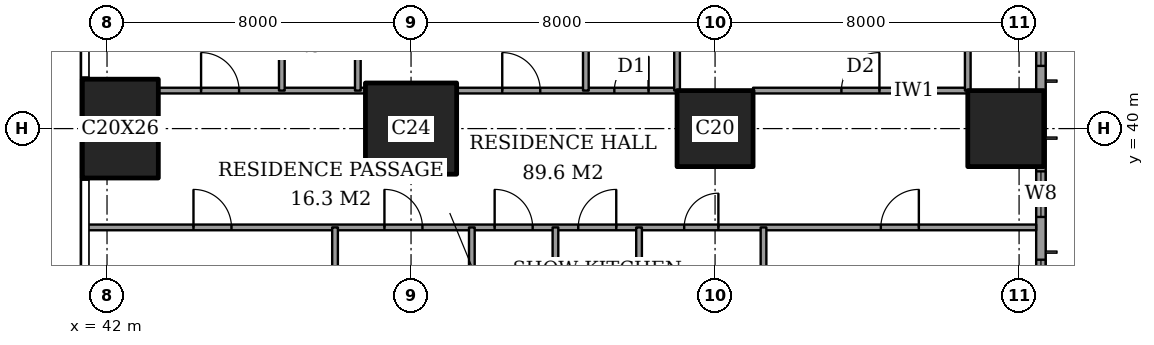
"""IFC4 building model, lengths in metres.
Left out: names, types, materials, properties, quantities, classifications, styles, units other than length and angle.
Written with IfcOpenShell. Run it as: python <this file> out.ifc"""

import sys

from ifc_helpers import new_model, si_unit, direction, frame, frame_2d, origin, origin_2d, place, context, subcontext, project, spatial, rectangle, extrude, element, fill, save


model = new_model("IFC4")
c1 = context("Model", 3, precision=1e-05, world=origin(), true_north=direction((0.0, 1.0)))
c2 = subcontext(c1, "Body", "Model", "MODEL_VIEW")
j1 = project(units=[si_unit("LENGTHUNIT", "METRE"), si_unit("PLANEANGLEUNIT", "RADIAN")], contexts=[c1])
p1 = place(None, origin())
s1 = spatial("IfcSite", under=j1, at=p1, CompositionType="ELEMENT")
p2 = place(p1, origin())
s2 = spatial("IfcBuilding", under=s1, at=p2, CompositionType="ELEMENT")
p3 = place(p2, frame((0.0, 0.0, 36.8)))
s3 = spatial("IfcBuildingStorey", under=s2, at=p3, CompositionType="ELEMENT", Elevation=36.8)
p4 = place(p3, frame((42.35, 40.0, 0.0), z_axis=(0.0, 0.0, 1.0), x_axis=(1.0, 0.0, 0.0)))
e1 = element("IfcColumn", 1, at=p4, inside=s3, PredefinedType="COLUMN", context=c2, shape_type="SweptSolid", body=[
    extrude(rectangle(XDim=2.0, YDim=2.6, at=origin_2d()), origin(), (0.0, 0.0, 1.0), 3.6),
])
p5 = place(p3, frame((50.0, 40.0, 0.0), z_axis=(0.0, 0.0, 1.0), x_axis=(1.0, 0.0, 0.0)))
e2 = element("IfcColumn", 2, at=p5, inside=s3, PredefinedType="COLUMN", context=c2, shape_type="SweptSolid", body=[
    extrude(rectangle(XDim=2.4, YDim=2.4, at=origin_2d()), origin(), (0.0, 0.0, 1.0), 3.6),
])
for number, where, z_axis, x_axis in (
    (3, (58.0, 40.0, 0.0), (0.0, 0.0, 1.0), (1.0, 0.0, 0.0)),
    (4, (65.65, 40.0, 0.0), (0.0, 0.0, 1.0), (1.0, 0.0, 0.0)),
):
    element("IfcColumn", number, at=place(p3, frame(where, z_axis=z_axis, x_axis=x_axis)), inside=s3, PredefinedType="COLUMN", context=c2, shape_type="SweptSolid", body=[
        extrude(rectangle(XDim=2.0, YDim=2.0, at=origin_2d()), origin(), (0.0, 0.0, 1.0), 3.6),
    ])
p6 = place(p3, frame((66.575, 3.175, 0.0), z_axis=(0.0, 0.0, 1.0), x_axis=(0.0, 1.0, 0.0)))
e5 = element("IfcWall", 5, at=p6, inside=s3, PredefinedType="SOLIDWALL", context=c2, shape_type="SweptSolid", body=[
    extrude(rectangle(XDim=41.65, YDim=0.25, at=frame_2d((20.825, 0.0))), origin(), (0.0, 0.0, 1.0), 3.6),
])
p7 = place(p6, frame((0.775, 0.0, 0.6)))
e6 = element("IfcOpeningElement", 6, at=p7, cuts=e5, PredefinedType="OPENING", context=c2, shape_type="SweptSolid", body=[
    extrude(rectangle(XDim=2.4, YDim=2.0, at=frame_2d((1.2, 1.0))), frame((0.0, 0.135, 0.0), z_axis=(0.0, -1.0, 0.0), x_axis=(1.0, 0.0, 0.0)), (0.0, 0.0, 1.0), 0.27),
])
p8 = place(p6, frame((6.1, 0.0, 0.6)))
e7 = element("IfcOpeningElement", 7, at=p8, cuts=e5, PredefinedType="OPENING", context=c2, shape_type="SweptSolid", body=[
    extrude(rectangle(XDim=1.2, YDim=2.0, at=frame_2d((0.6, 1.0))), frame((0.0, 0.135, 0.0), z_axis=(0.0, -1.0, 0.0), x_axis=(1.0, 0.0, 0.0)), (0.0, 0.0, 1.0), 0.27),
])
p9 = place(p6, frame((8.275, 0.0, 0.6)))
e8 = element("IfcOpeningElement", 8, at=p9, cuts=e5, PredefinedType="OPENING", context=c2, shape_type="SweptSolid", body=[
    extrude(rectangle(XDim=2.4, YDim=2.0, at=frame_2d((1.2, 1.0))), frame((0.0, 0.135, 0.0), z_axis=(0.0, -1.0, 0.0), x_axis=(1.0, 0.0, 0.0)), (0.0, 0.0, 1.0), 0.27),
])
p10 = place(p6, frame((15.775, 0.0, 0.6)))
e9 = element("IfcOpeningElement", 9, at=p10, cuts=e5, PredefinedType="OPENING", context=c2, shape_type="SweptSolid", body=[
    extrude(rectangle(XDim=2.4, YDim=2.0, at=frame_2d((1.2, 1.0))), frame((0.0, 0.135, 0.0), z_axis=(0.0, -1.0, 0.0), x_axis=(1.0, 0.0, 0.0)), (0.0, 0.0, 1.0), 0.27),
])
p11 = place(p6, frame((23.475, 0.0, 0.6)))
e10 = element("IfcOpeningElement", 10, at=p11, cuts=e5, PredefinedType="OPENING", context=c2, shape_type="SweptSolid", body=[
    extrude(rectangle(XDim=2.4, YDim=2.0, at=frame_2d((1.2, 1.0))), frame((0.0, 0.135, 0.0), z_axis=(0.0, -1.0, 0.0), x_axis=(1.0, 0.0, 0.0)), (0.0, 0.0, 1.0), 0.27),
])
p12 = place(p6, frame((30.975, 0.0, 0.6)))
e11 = element("IfcOpeningElement", 11, at=p12, cuts=e5, PredefinedType="OPENING", context=c2, shape_type="SweptSolid", body=[
    extrude(rectangle(XDim=2.4, YDim=2.0, at=frame_2d((1.2, 1.0))), frame((0.0, 0.135, 0.0), z_axis=(0.0, -1.0, 0.0), x_axis=(1.0, 0.0, 0.0)), (0.0, 0.0, 1.0), 0.27),
])
p13 = place(p6, frame((34.5, 0.0, 0.6)))
e12 = element("IfcOpeningElement", 12, at=p13, cuts=e5, PredefinedType="OPENING", context=c2, shape_type="SweptSolid", body=[
    extrude(rectangle(XDim=1.2, YDim=2.0, at=frame_2d((0.6, 1.0))), frame((0.0, 0.135, 0.0), z_axis=(0.0, -1.0, 0.0), x_axis=(1.0, 0.0, 0.0)), (0.0, 0.0, 1.0), 0.27),
])
p14 = place(p6, frame((38.475, 0.0, 0.6)))
e13 = element("IfcOpeningElement", 13, at=p14, cuts=e5, PredefinedType="OPENING", context=c2, shape_type="SweptSolid", body=[
    extrude(rectangle(XDim=2.4, YDim=2.0, at=frame_2d((1.2, 1.0))), frame((0.0, 0.135, 0.0), z_axis=(0.0, -1.0, 0.0), x_axis=(1.0, 0.0, 0.0)), (0.0, 0.0, 1.0), 0.27),
])
p15 = place(p3, frame((41.439, 37.4, 0.0), z_axis=(0.0, 0.0, 1.0), x_axis=(1.0, 0.0, 0.0)))
e14 = element("IfcWall", 14, at=p15, inside=s3, PredefinedType="PARTITIONING", context=c2, shape_type="SweptSolid", body=[
    extrude(rectangle(XDim=25.011, YDim=0.15, at=frame_2d((12.505, 0.0))), origin(), (0.0, 0.0, 1.0), 3.35),
])
p16 = place(p15, frame((10.761, 0.0, 0.0)))
e15 = element("IfcOpeningElement", 15, at=p16, cuts=e14, PredefinedType="OPENING", context=c2, shape_type="SweptSolid", body=[
    extrude(rectangle(XDim=1.0, YDim=2.1, at=frame_2d((0.5, 1.05))), frame((0.0, 0.085, 0.0), z_axis=(0.0, -1.0, 0.0), x_axis=(1.0, 0.0, 0.0)), (0.0, 0.0, 1.0), 0.17),
])
p17 = place(p15, frame((20.924, 0.0, 0.0)))
e16 = element("IfcOpeningElement", 16, at=p17, cuts=e14, PredefinedType="OPENING", context=c2, shape_type="SweptSolid", body=[
    extrude(rectangle(XDim=1.0, YDim=2.1, at=frame_2d((0.5, 1.05))), frame((0.0, 0.085, 0.0), z_axis=(0.0, -1.0, 0.0), x_axis=(1.0, 0.0, 0.0)), (0.0, 0.0, 1.0), 0.17),
])
p18 = place(p15, frame((15.749, 0.0, 0.0)))
e17 = element("IfcOpeningElement", 17, at=p18, cuts=e14, PredefinedType="OPENING", context=c2, shape_type="SweptSolid", body=[
    extrude(rectangle(XDim=0.9, YDim=2.1, at=frame_2d((0.45, 1.05))), frame((0.0, 0.085, 0.0), z_axis=(0.0, -1.0, 0.0), x_axis=(1.0, 0.0, 0.0)), (0.0, 0.0, 1.0), 0.17),
])
p19 = place(p15, frame((12.961, 0.0, 0.0)))
e18 = element("IfcOpeningElement", 18, at=p19, cuts=e14, PredefinedType="OPENING", context=c2, shape_type="SweptSolid", body=[
    extrude(rectangle(XDim=1.0, YDim=2.1, at=frame_2d((0.5, 1.05))), frame((0.0, 0.085, 0.0), z_axis=(0.0, -1.0, 0.0), x_axis=(1.0, 0.0, 0.0)), (0.0, 0.0, 1.0), 0.17),
])
p20 = place(p15, frame((7.861, 0.0, 0.0)))
e19 = element("IfcOpeningElement", 19, at=p20, cuts=e14, PredefinedType="OPENING", context=c2, shape_type="SweptSolid", body=[
    extrude(rectangle(XDim=1.0, YDim=2.1, at=frame_2d((0.5, 1.05))), frame((0.0, 0.085, 0.0), z_axis=(0.0, -1.0, 0.0), x_axis=(1.0, 0.0, 0.0)), (0.0, 0.0, 1.0), 0.17),
])
p21 = place(p15, frame((2.836, 0.0, 0.0)))
e20 = element("IfcOpeningElement", 20, at=p21, cuts=e14, PredefinedType="OPENING", context=c2, shape_type="SweptSolid", body=[
    extrude(rectangle(XDim=1.0, YDim=2.1, at=frame_2d((0.5, 1.05))), frame((0.0, 0.085, 0.0), z_axis=(0.0, -1.0, 0.0), x_axis=(1.0, 0.0, 0.0)), (0.0, 0.0, 1.0), 0.17),
])
p22 = place(p3, frame((43.35, 41.0, 0.0), z_axis=(0.0, 0.0, 1.0), x_axis=(1.0, 0.0, 0.0)))
e21 = element("IfcWall", 21, at=p22, inside=s3, PredefinedType="PARTITIONING", context=c2, shape_type="SweptSolid", body=[
    extrude(rectangle(XDim=5.45, YDim=0.15, at=frame_2d((2.725, 0.0))), origin(), (0.0, 0.0, 1.0), 3.35),
])
p23 = place(p22, frame((1.125, 0.0, 0.0)))
e22 = element("IfcOpeningElement", 22, at=p23, cuts=e21, PredefinedType="OPENING", context=c2, shape_type="SweptSolid", body=[
    extrude(rectangle(XDim=1.0, YDim=2.1, at=frame_2d((0.5, 1.05))), frame((0.0, 0.085, 0.0), z_axis=(0.0, -1.0, 0.0), x_axis=(1.0, 0.0, 0.0)), (0.0, 0.0, 1.0), 0.17),
])
p24 = place(p3, frame((51.2, 41.0, 0.0), z_axis=(0.0, 0.0, 1.0), x_axis=(1.0, 0.0, 0.0)))
e23 = element("IfcWall", 23, at=p24, inside=s3, PredefinedType="PARTITIONING", context=c2, shape_type="SweptSolid", body=[
    extrude(rectangle(XDim=5.8, YDim=0.15, at=frame_2d((2.9, 0.0))), origin(), (0.0, 0.0, 1.0), 3.35),
])
p25 = place(p24, frame((4.15, 0.0, 0.0)))
e24 = element("IfcOpeningElement", 24, at=p25, cuts=e23, PredefinedType="OPENING", context=c2, shape_type="SweptSolid", body=[
    extrude(rectangle(XDim=0.9, YDim=2.1, at=frame_2d((0.45, 1.05))), frame((0.0, 0.085, 0.0), z_axis=(0.0, -1.0, 0.0), x_axis=(1.0, 0.0, 0.0)), (0.0, 0.0, 1.0), 0.17),
])
p26 = place(p24, frame((1.2, 0.0, 0.0)))
e25 = element("IfcOpeningElement", 25, at=p26, cuts=e23, PredefinedType="OPENING", context=c2, shape_type="SweptSolid", body=[
    extrude(rectangle(XDim=1.0, YDim=2.1, at=frame_2d((0.5, 1.05))), frame((0.0, 0.085, 0.0), z_axis=(0.0, -1.0, 0.0), x_axis=(1.0, 0.0, 0.0)), (0.0, 0.0, 1.0), 0.17),
])
p27 = place(p3, frame((59.0, 41.0, 0.0), z_axis=(0.0, 0.0, 1.0), x_axis=(1.0, 0.0, 0.0)))
e26 = element("IfcWall", 26, at=p27, inside=s3, PredefinedType="PARTITIONING", context=c2, shape_type="SweptSolid", body=[
    extrude(rectangle(XDim=5.65, YDim=0.15, at=frame_2d((2.825, 0.0))), origin(), (0.0, 0.0, 1.0), 3.35),
])
p28 = place(p27, frame((2.325, 0.0, 0.0)))
e27 = element("IfcOpeningElement", 27, at=p28, cuts=e26, PredefinedType="OPENING", context=c2, shape_type="SweptSolid", body=[
    extrude(rectangle(XDim=1.0, YDim=2.1, at=frame_2d((0.5, 1.05))), frame((0.0, 0.085, 0.0), z_axis=(0.0, -1.0, 0.0), x_axis=(1.0, 0.0, 0.0)), (0.0, 0.0, 1.0), 0.17),
])
p29 = place(p3, frame((46.6, 41.0, 0.0), z_axis=(0.0, 0.0, 1.0), x_axis=(0.0, 1.0, 0.0)))
e28 = element("IfcWall", 28, at=p29, inside=s3, PredefinedType="PARTITIONING", context=c2, shape_type="SweptSolid", body=[
    extrude(rectangle(XDim=7.45, YDim=0.15, at=frame_2d((3.725, 0.0))), origin(), (0.0, 0.0, 1.0), 3.35),
])
p30 = place(p29, frame((3.275, 0.0, 0.0)))
e29 = element("IfcOpeningElement", 29, at=p30, cuts=e28, PredefinedType="OPENING", context=c2, shape_type="SweptSolid", body=[
    extrude(rectangle(XDim=0.9, YDim=2.1, at=frame_2d((0.45, 1.05))), frame((0.0, 0.085, 0.0), z_axis=(0.0, -1.0, 0.0), x_axis=(1.0, 0.0, 0.0)), (0.0, 0.0, 1.0), 0.17),
])
p31 = place(p3, frame((48.0, 28.0, 0.0), z_axis=(0.0, 0.0, 1.0), x_axis=(0.0, 1.0, 0.0)))
e30 = element("IfcWall", 30, at=p31, inside=s3, PredefinedType="PARTITIONING", context=c2, shape_type="SweptSolid", body=[
    extrude(rectangle(XDim=9.4, YDim=0.15, at=frame_2d((4.7, 0.0))), origin(), (0.0, 0.0, 1.0), 3.35),
])
p32 = place(p31, frame((0.55, 0.0, 0.0)))
e31 = element("IfcOpeningElement", 31, at=p32, cuts=e30, PredefinedType="OPENING", context=c2, shape_type="SweptSolid", body=[
    extrude(rectangle(XDim=0.9, YDim=2.1, at=frame_2d((0.45, 1.05))), frame((0.0, 0.085, 0.0), z_axis=(0.0, -1.0, 0.0), x_axis=(1.0, 0.0, 0.0)), (0.0, 0.0, 1.0), 0.17),
])
p33 = place(p3, frame((48.6, 41.0, 0.0), z_axis=(0.0, 0.0, 1.0), x_axis=(0.0, 1.0, 0.0)))
e32 = element("IfcWall", 32, at=p33, inside=s3, PredefinedType="PARTITIONING", context=c2, shape_type="SweptSolid", body=[
    extrude(rectangle(XDim=7.45, YDim=0.15, at=frame_2d((3.725, 0.0))), origin(), (0.0, 0.0, 1.0), 3.35),
])
for number, where, z_axis, x_axis in (
    (33, (51.6, 30.0, 0.0), (0.0, 0.0, 1.0), (0.0, 1.0, 0.0)),
    (34, (53.8, 30.0, 0.0), (0.0, 0.0, 1.0), (0.0, 1.0, 0.0)),
):
    element("IfcWall", number, at=place(p3, frame(where, z_axis=z_axis, x_axis=x_axis)), inside=s3, PredefinedType="PARTITIONING", context=c2, shape_type="SweptSolid", body=[
        extrude(rectangle(XDim=7.4, YDim=0.15, at=frame_2d((3.7, 0.0))), origin(), (0.0, 0.0, 1.0), 3.35),
    ])
p34 = place(p3, frame((54.6, 41.0, 0.0), z_axis=(0.0, 0.0, 1.0), x_axis=(0.0, 1.0, 0.0)))
e35 = element("IfcWall", 35, at=p34, inside=s3, PredefinedType="PARTITIONING", context=c2, shape_type="SweptSolid", body=[
    extrude(rectangle(XDim=7.45, YDim=0.15, at=frame_2d((3.725, 0.0))), origin(), (0.0, 0.0, 1.0), 3.35),
])
p35 = place(p3, frame((56.0, 28.0, 0.0), z_axis=(0.0, 0.0, 1.0), x_axis=(0.0, 1.0, 0.0)))
e36 = element("IfcWall", 36, at=p35, inside=s3, PredefinedType="PARTITIONING", context=c2, shape_type="SweptSolid", body=[
    extrude(rectangle(XDim=9.4, YDim=0.15, at=frame_2d((4.7, 0.0))), origin(), (0.0, 0.0, 1.0), 3.35),
])
p36 = place(p35, frame((0.5, 0.0, 0.0)))
e37 = element("IfcOpeningElement", 37, at=p36, cuts=e36, PredefinedType="OPENING", context=c2, shape_type="SweptSolid", body=[
    extrude(rectangle(XDim=1.0, YDim=2.1, at=frame_2d((0.5, 1.05))), frame((0.0, 0.085, 0.0), z_axis=(0.0, -1.0, 0.0), x_axis=(1.0, 0.0, 0.0)), (0.0, 0.0, 1.0), 0.17),
])
p37 = place(p3, frame((57.0, 41.0, 0.0), z_axis=(0.0, 0.0, 1.0), x_axis=(0.0, 1.0, 0.0)))
e38 = element("IfcWall", 38, at=p37, inside=s3, PredefinedType="PARTITIONING", context=c2, shape_type="SweptSolid", body=[
    extrude(rectangle(XDim=5.65, YDim=0.15, at=frame_2d((2.825, 0.0))), origin(), (0.0, 0.0, 1.0), 3.35),
])
p38 = place(p3, frame((59.275, 33.2, 0.0), z_axis=(0.0, 0.0, 1.0), x_axis=(0.0, 1.0, 0.0)))
e39 = element("IfcWall", 39, at=p38, inside=s3, PredefinedType="PARTITIONING", context=c2, shape_type="SweptSolid", body=[
    extrude(rectangle(XDim=4.2, YDim=0.15, at=frame_2d((2.1, 0.0))), origin(), (0.0, 0.0, 1.0), 3.35),
])
p39 = place(p3, frame((64.65, 41.0, 0.0), z_axis=(0.0, 0.0, 1.0), x_axis=(0.0, 1.0, 0.0)))
e40 = element("IfcWall", 40, at=p39, inside=s3, PredefinedType="PARTITIONING", context=c2, shape_type="SweptSolid", body=[
    extrude(rectangle(XDim=3.7, YDim=0.15, at=frame_2d((1.85, 0.0))), origin(), (0.0, 0.0, 1.0), 3.35),
])
p40 = place(p39, frame((1.4, 0.0, 0.0)))
e41 = element("IfcOpeningElement", 41, at=p40, cuts=e40, PredefinedType="OPENING", context=c2, shape_type="SweptSolid", body=[
    extrude(rectangle(XDim=0.9, YDim=2.1, at=frame_2d((0.45, 1.05))), frame((0.0, 0.085, 0.0), z_axis=(0.0, -1.0, 0.0), x_axis=(1.0, 0.0, 0.0)), (0.0, 0.0, 1.0), 0.17),
])
p41 = place(p12, origin())
e42 = element("IfcWindow", 42, at=p41, inside=s3, PartitioningType="SINGLE_PANEL", PredefinedType="WINDOW", context=c2, shape_type="SweptSolid", body=[
    extrude(rectangle(XDim=2.4, YDim=2.0, at=frame_2d((1.2, 1.0))), frame((0.0, 0.03, 0.0), z_axis=(0.0, -1.0, 0.0), x_axis=(1.0, 0.0, 0.0)), (0.0, 0.0, 1.0), 0.06),
])
fill(e11, e42)
p42 = place(p13, origin())
e43 = element("IfcWindow", 43, at=p42, inside=s3, PartitioningType="SINGLE_PANEL", PredefinedType="WINDOW", context=c2, shape_type="SweptSolid", body=[
    extrude(rectangle(XDim=1.2, YDim=2.0, at=frame_2d((0.6, 1.0))), frame((0.0, 0.03, 0.0), z_axis=(0.0, -1.0, 0.0), x_axis=(1.0, 0.0, 0.0)), (0.0, 0.0, 1.0), 0.06),
])
fill(e12, e43)
p43 = place(p14, origin())
e44 = element("IfcWindow", 44, at=p43, inside=s3, PartitioningType="SINGLE_PANEL", PredefinedType="WINDOW", context=c2, shape_type="SweptSolid", body=[
    extrude(rectangle(XDim=2.4, YDim=2.0, at=frame_2d((1.2, 1.0))), frame((0.0, 0.03, 0.0), z_axis=(0.0, -1.0, 0.0), x_axis=(1.0, 0.0, 0.0)), (0.0, 0.0, 1.0), 0.06),
])
fill(e13, e44)
p44 = place(p28, origin())
e45 = element("IfcDoor", 45, at=p44, inside=s3, OperationType="SINGLE_SWING_LEFT", PredefinedType="DOOR", context=c2, shape_type="SweptSolid", body=[
    extrude(rectangle(XDim=1.0, YDim=2.1, at=frame_2d((0.5, 1.05))), frame((0.0, 0.025, 0.0), z_axis=(0.0, -1.0, 0.0), x_axis=(1.0, 0.0, 0.0)), (0.0, 0.0, 1.0), 0.05),
])
fill(e27, e45)
p45 = place(p25, origin())
e46 = element("IfcDoor", 46, at=p45, inside=s3, OperationType="SINGLE_SWING_LEFT", PredefinedType="DOOR", context=c2, shape_type="SweptSolid", body=[
    extrude(rectangle(XDim=0.9, YDim=2.1, at=frame_2d((0.45, 1.05))), frame((0.0, 0.025, 0.0), z_axis=(0.0, -1.0, 0.0), x_axis=(1.0, 0.0, 0.0)), (0.0, 0.0, 1.0), 0.05),
])
fill(e24, e46)
p46 = place(p26, origin())
e47 = element("IfcDoor", 47, at=p46, inside=s3, OperationType="SINGLE_SWING_RIGHT", PredefinedType="DOOR", context=c2, shape_type="SweptSolid", body=[
    extrude(rectangle(XDim=1.0, YDim=2.1, at=frame_2d((0.5, 1.05))), frame((0.0, 0.025, 0.0), z_axis=(0.0, -1.0, 0.0), x_axis=(1.0, 0.0, 0.0)), (0.0, 0.0, 1.0), 0.05),
])
fill(e25, e47)
p47 = place(p23, origin())
e48 = element("IfcDoor", 48, at=p47, inside=s3, OperationType="SINGLE_SWING_RIGHT", PredefinedType="DOOR", context=c2, shape_type="SweptSolid", body=[
    extrude(rectangle(XDim=1.0, YDim=2.1, at=frame_2d((0.5, 1.05))), frame((0.0, 0.025, 0.0), z_axis=(0.0, -1.0, 0.0), x_axis=(1.0, 0.0, 0.0)), (0.0, 0.0, 1.0), 0.05),
])
fill(e22, e48)
p48 = place(p16, origin())
e49 = element("IfcDoor", 49, at=p48, inside=s3, OperationType="SINGLE_SWING_RIGHT", PredefinedType="DOOR", context=c2, shape_type="SweptSolid", body=[
    extrude(rectangle(XDim=1.0, YDim=2.1, at=frame_2d((0.5, 1.05))), frame((0.0, 0.025, 0.0), z_axis=(0.0, -1.0, 0.0), x_axis=(1.0, 0.0, 0.0)), (0.0, 0.0, 1.0), 0.05),
])
fill(e15, e49)
p49 = place(p17, origin())
e50 = element("IfcDoor", 50, at=p49, inside=s3, OperationType="SINGLE_SWING_LEFT", PredefinedType="DOOR", context=c2, shape_type="SweptSolid", body=[
    extrude(rectangle(XDim=1.0, YDim=2.1, at=frame_2d((0.5, 1.05))), frame((0.0, 0.025, 0.0), z_axis=(0.0, -1.0, 0.0), x_axis=(1.0, 0.0, 0.0)), (0.0, 0.0, 1.0), 0.05),
])
fill(e16, e50)
p50 = place(p18, origin())
e51 = element("IfcDoor", 51, at=p50, inside=s3, OperationType="SINGLE_SWING_LEFT", PredefinedType="DOOR", context=c2, shape_type="SweptSolid", body=[
    extrude(rectangle(XDim=0.9, YDim=2.1, at=frame_2d((0.45, 1.05))), frame((0.0, 0.025, 0.0), z_axis=(0.0, -1.0, 0.0), x_axis=(1.0, 0.0, 0.0)), (0.0, 0.0, 1.0), 0.05),
])
fill(e17, e51)
p51 = place(p19, origin())
e52 = element("IfcDoor", 52, at=p51, inside=s3, OperationType="SINGLE_SWING_LEFT", PredefinedType="DOOR", context=c2, shape_type="SweptSolid", body=[
    extrude(rectangle(XDim=1.0, YDim=2.1, at=frame_2d((0.5, 1.05))), frame((0.0, 0.025, 0.0), z_axis=(0.0, -1.0, 0.0), x_axis=(1.0, 0.0, 0.0)), (0.0, 0.0, 1.0), 0.05),
])
fill(e18, e52)
p52 = place(p20, origin())
e53 = element("IfcDoor", 53, at=p52, inside=s3, OperationType="SINGLE_SWING_RIGHT", PredefinedType="DOOR", context=c2, shape_type="SweptSolid", body=[
    extrude(rectangle(XDim=1.0, YDim=2.1, at=frame_2d((0.5, 1.05))), frame((0.0, 0.025, 0.0), z_axis=(0.0, -1.0, 0.0), x_axis=(1.0, 0.0, 0.0)), (0.0, 0.0, 1.0), 0.05),
])
fill(e19, e53)
p53 = place(p21, origin())
e54 = element("IfcDoor", 54, at=p53, inside=s3, OperationType="SINGLE_SWING_RIGHT", PredefinedType="DOOR", context=c2, shape_type="SweptSolid", body=[
    extrude(rectangle(XDim=1.0, YDim=2.1, at=frame_2d((0.5, 1.05))), frame((0.0, 0.025, 0.0), z_axis=(0.0, -1.0, 0.0), x_axis=(1.0, 0.0, 0.0)), (0.0, 0.0, 1.0), 0.05),
])
fill(e20, e54)
save(model, sys.argv[1])
